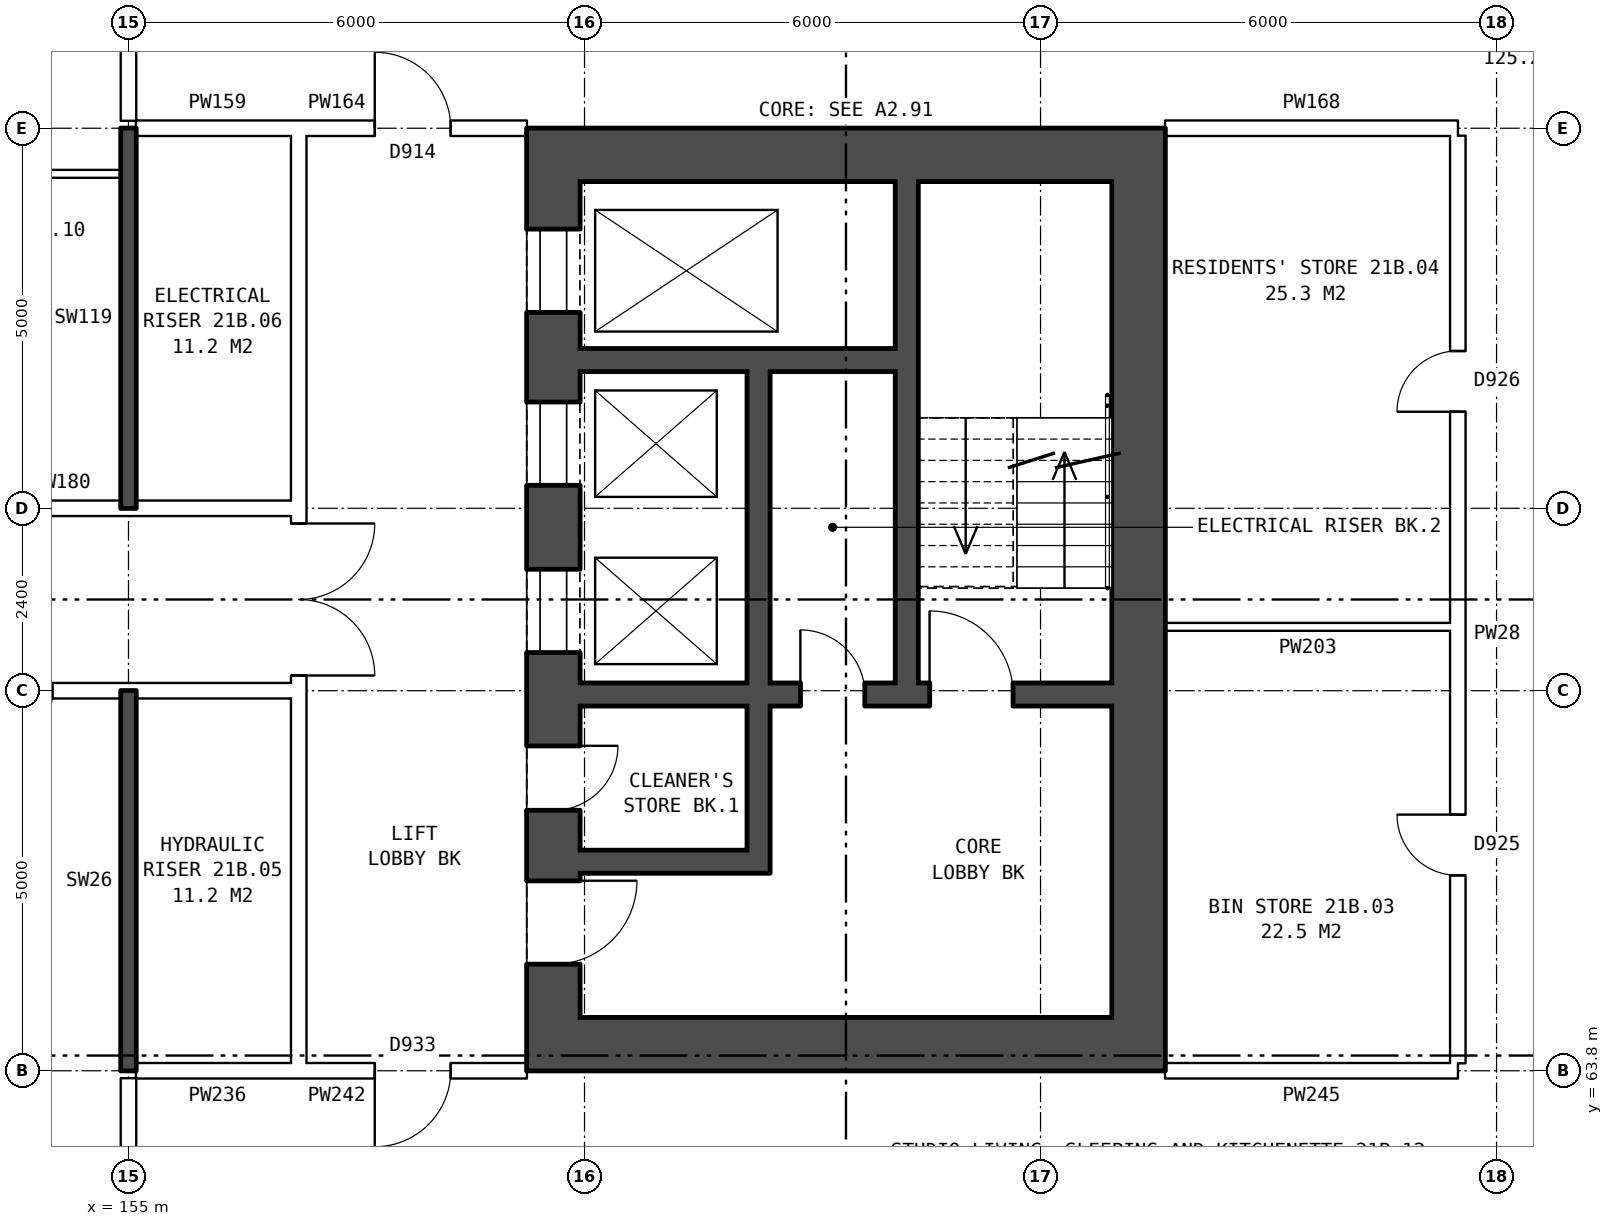
"""IFC4 building model, lengths in metres.
Left out: names, types, materials, properties, quantities, classifications, styles, units other than length and angle.
Written with IfcOpenShell. Run it as: python <this file> out.ifc"""

import sys

from ifc_helpers import new_model, si_unit, direction, frame, frame_2d, origin, place, context, subcontext, project, spatial, rectangle, extrude, element, fill, save


model = new_model("IFC4")
c1 = context("Model", 3, precision=1e-05, world=origin(), true_north=direction((0.0, 1.0)))
c2 = subcontext(c1, "Body", "Model", "MODEL_VIEW")
j1 = project(units=[si_unit("LENGTHUNIT", "METRE"), si_unit("PLANEANGLEUNIT", "RADIAN")], contexts=[c1])
p1 = place(None, origin())
s1 = spatial("IfcSite", under=j1, at=p1, CompositionType="ELEMENT")
p2 = place(p1, origin())
s2 = spatial("IfcBuilding", under=s1, at=p2, CompositionType="ELEMENT")
p3 = place(p2, frame((0.0, 0.0, 77.8)))
s3 = spatial("IfcBuildingStorey", under=s2, at=p3, CompositionType="ELEMENT", Elevation=77.8)
p4 = place(p3, frame((160.59, 75.5, 0.0), z_axis=(0.0, 0.0, 1.0), x_axis=(0.0, -1.0, 0.0)))
e1 = element("IfcWall", 1, at=p4, inside=s3, PredefinedType="SHEAR", context=c2, shape_type="SweptSolid", body=[
    extrude(rectangle(XDim=11.0, YDim=0.7, at=frame_2d((5.5, 0.0))), origin(), (0.0, 0.0, 1.0), 2.85),
])
p5 = place(p4, frame((0.625, 0.0, 0.0)))
e2 = element("IfcOpeningElement", 2, at=p5, cuts=e1, PredefinedType="OPENING", context=c2, shape_type="SweptSolid", body=[
    extrude(rectangle(XDim=1.1, YDim=2.1, at=frame_2d((0.55, 1.05))), frame((0.0, 0.36, 0.0), z_axis=(0.0, -1.0, 0.0), x_axis=(1.0, 0.0, 0.0)), (0.0, 0.0, 1.0), 0.72),
])
p6 = place(p4, frame((2.9, 0.0, 0.0)))
e3 = element("IfcOpeningElement", 3, at=p6, cuts=e1, PredefinedType="OPENING", context=c2, shape_type="SweptSolid", body=[
    extrude(rectangle(XDim=1.1, YDim=2.1, at=frame_2d((0.55, 1.05))), frame((0.0, 0.36, 0.0), z_axis=(0.0, -1.0, 0.0), x_axis=(1.0, 0.0, 0.0)), (0.0, 0.0, 1.0), 0.72),
])
p7 = place(p4, frame((5.1, 0.0, 0.0)))
e4 = element("IfcOpeningElement", 4, at=p7, cuts=e1, PredefinedType="OPENING", context=c2, shape_type="SweptSolid", body=[
    extrude(rectangle(XDim=1.1, YDim=2.1, at=frame_2d((0.55, 1.05))), frame((0.0, 0.36, 0.0), z_axis=(0.0, -1.0, 0.0), x_axis=(1.0, 0.0, 0.0)), (0.0, 0.0, 1.0), 0.72),
])
p8 = place(p4, frame((9.2, 0.0, 0.0)))
e5 = element("IfcOpeningElement", 5, at=p8, cuts=e1, PredefinedType="OPENING", context=c2, shape_type="SweptSolid", body=[
    extrude(rectangle(XDim=1.1, YDim=2.1, at=frame_2d((0.55, 1.05))), frame((0.0, 0.36, 0.0), z_axis=(0.0, -1.0, 0.0), x_axis=(1.0, 0.0, 0.0)), (0.0, 0.0, 1.0), 0.72),
])
p9 = place(p4, frame((7.425, 0.0, 0.0)))
e6 = element("IfcOpeningElement", 6, at=p9, cuts=e1, PredefinedType="OPENING", context=c2, shape_type="SweptSolid", body=[
    extrude(rectangle(XDim=0.85, YDim=2.1, at=frame_2d((0.425, 1.05))), frame((0.0, 0.36, 0.0), z_axis=(0.0, -1.0, 0.0), x_axis=(1.0, 0.0, 0.0)), (0.0, 0.0, 1.0), 0.72),
])
p10 = place(p3, frame((168.29, 75.5, 0.0), z_axis=(0.0, 0.0, 1.0), x_axis=(0.0, -1.0, 0.0)))
e7 = element("IfcWall", 7, at=p10, inside=s3, PredefinedType="SHEAR", context=c2, shape_type="SweptSolid", body=[
    extrude(rectangle(XDim=11.0, YDim=0.7, at=frame_2d((5.5, 0.0))), origin(), (0.0, 0.0, 1.0), 2.85),
])
for number, where, z_axis, x_axis in (
    (8, (160.24, 75.85, 0.0), (0.0, 0.0, 1.0), (1.0, 0.0, 0.0)),
    (9, (160.24, 64.15, 0.0), (0.0, 0.0, 1.0), (1.0, 0.0, 0.0)),
):
    element("IfcWall", number, at=place(p3, frame(where, z_axis=z_axis, x_axis=x_axis)), inside=s3, PredefinedType="SHEAR", context=c2, shape_type="SweptSolid", body=[
        extrude(rectangle(XDim=8.4, YDim=0.7, at=frame_2d((4.2, 0.0))), origin(), (0.0, 0.0, 1.0), 2.85),
    ])
p11 = place(p3, frame((160.94, 73.15, 0.0), z_axis=(0.0, 0.0, 1.0), x_axis=(1.0, 0.0, 0.0)))
e10 = element("IfcWall", 10, at=p11, inside=s3, PredefinedType="SHEAR", context=c2, shape_type="SweptSolid", body=[
    extrude(rectangle(XDim=4.15, YDim=0.3, at=frame_2d((2.075, 0.0))), origin(), (0.0, 0.0, 1.0), 2.85),
])
p12 = place(p3, frame((160.94, 68.75, 0.0), z_axis=(0.0, 0.0, 1.0), x_axis=(1.0, 0.0, 0.0)))
e11 = element("IfcWall", 11, at=p12, inside=s3, PredefinedType="SHEAR", context=c2, shape_type="SweptSolid", body=[
    extrude(rectangle(XDim=7.0, YDim=0.3, at=frame_2d((3.5, 0.0))), origin(), (0.0, 0.0, 1.0), 2.85),
])
p13 = place(p12, frame((4.6, 0.0, 0.0)))
e12 = element("IfcOpeningElement", 12, at=p13, cuts=e11, PredefinedType="OPENING", context=c2, shape_type="SweptSolid", body=[
    extrude(rectangle(XDim=1.1, YDim=2.1, at=frame_2d((0.55, 1.05))), frame((0.0, 0.16, 0.0), z_axis=(0.0, -1.0, 0.0), x_axis=(1.0, 0.0, 0.0)), (0.0, 0.0, 1.0), 0.32),
])
p14 = place(p12, frame((2.9, 0.0, 0.0)))
e13 = element("IfcOpeningElement", 13, at=p14, cuts=e11, PredefinedType="OPENING", context=c2, shape_type="SweptSolid", body=[
    extrude(rectangle(XDim=0.85, YDim=2.1, at=frame_2d((0.425, 1.05))), frame((0.0, 0.16, 0.0), z_axis=(0.0, -1.0, 0.0), x_axis=(1.0, 0.0, 0.0)), (0.0, 0.0, 1.0), 0.32),
])
p15 = place(p3, frame((160.94, 66.55, 0.0), z_axis=(0.0, 0.0, 1.0), x_axis=(1.0, 0.0, 0.0)))
e14 = element("IfcWall", 14, at=p15, inside=s3, PredefinedType="SHEAR", context=c2, shape_type="SweptSolid", body=[
    extrude(rectangle(XDim=2.2, YDim=0.3, at=frame_2d((1.1, 0.0))), origin(), (0.0, 0.0, 1.0), 2.85),
])
p16 = place(p3, frame((163.29, 73.0, 0.0), z_axis=(0.0, 0.0, 1.0), x_axis=(0.0, -1.0, 0.0)))
e15 = element("IfcWall", 15, at=p16, inside=s3, PredefinedType="SHEAR", context=c2, shape_type="SweptSolid", body=[
    extrude(rectangle(XDim=4.1, YDim=0.3, at=frame_2d((2.05, 0.0))), origin(), (0.0, 0.0, 1.0), 2.85),
])
p17 = place(p3, frame((163.29, 68.6, 0.0), z_axis=(0.0, 0.0, 1.0), x_axis=(0.0, -1.0, 0.0)))
e16 = element("IfcWall", 16, at=p17, inside=s3, PredefinedType="SHEAR", context=c2, shape_type="SweptSolid", body=[
    extrude(rectangle(XDim=2.2, YDim=0.3, at=frame_2d((1.1, 0.0))), origin(), (0.0, 0.0, 1.0), 2.85),
])
p18 = place(p3, frame((165.24, 75.5, 0.0), z_axis=(0.0, 0.0, 1.0), x_axis=(0.0, -1.0, 0.0)))
e17 = element("IfcWall", 17, at=p18, inside=s3, PredefinedType="SHEAR", context=c2, shape_type="SweptSolid", body=[
    extrude(rectangle(XDim=6.6, YDim=0.3, at=frame_2d((3.3, 0.0))), origin(), (0.0, 0.0, 1.0), 2.85),
])
p19 = place(p3, frame((157.24, 63.9, 0.0), z_axis=(0.0, 0.0, 1.0), x_axis=(0.0, 1.0, 0.0)))
e18 = element("IfcWall", 18, at=p19, inside=s3, PredefinedType="PARTITIONING", context=c2, shape_type="SweptSolid", body=[
    extrude(rectangle(XDim=12.2, YDim=0.2, at=frame_2d((6.1, 0.0))), origin(), (0.0, 0.0, 1.0), 2.85),
])
p20 = place(p19, frame((5.1, 0.0, 0.0)))
e19 = element("IfcOpeningElement", 19, at=p20, cuts=e18, PredefinedType="OPENING", context=c2, shape_type="SweptSolid", body=[
    extrude(rectangle(XDim=2.0, YDim=2.1, at=frame_2d((1.0, 1.05))), frame((0.0, 0.11, 0.0), z_axis=(0.0, -1.0, 0.0), x_axis=(1.0, 0.0, 0.0)), (0.0, 0.0, 1.0), 0.22),
])
p21 = place(p3, frame((155.1, 63.8, 0.0), z_axis=(0.0, 0.0, 1.0), x_axis=(1.0, 0.0, 0.0)))
e20 = element("IfcWall", 20, at=p21, inside=s3, PredefinedType="PARTITIONING", context=c2, shape_type="SweptSolid", body=[
    extrude(rectangle(XDim=2.14, YDim=0.2, at=frame_2d((1.07, 0.0))), origin(), (0.0, 0.0, 1.0), 2.85),
])
p22 = place(p3, frame((157.24, 63.8, 0.0), z_axis=(0.0, 0.0, 1.0), x_axis=(1.0, 0.0, 0.0)))
e21 = element("IfcWall", 21, at=p22, inside=s3, PredefinedType="PARTITIONING", context=c2, shape_type="SweptSolid", body=[
    extrude(rectangle(XDim=3.0, YDim=0.2, at=frame_2d((1.5, 0.0))), origin(), (0.0, 0.0, 1.0), 2.85),
])
p23 = place(p22, frame((1.0, 0.0, 0.0)))
e22 = element("IfcOpeningElement", 22, at=p23, cuts=e21, PredefinedType="OPENING", context=c2, shape_type="SweptSolid", body=[
    extrude(rectangle(XDim=1.0, YDim=2.1, at=frame_2d((0.5, 1.05))), frame((0.0, 0.11, 0.0), z_axis=(0.0, -1.0, 0.0), x_axis=(1.0, 0.0, 0.0)), (0.0, 0.0, 1.0), 0.22),
])
p24 = place(p3, frame((168.64, 63.8, 0.0), z_axis=(0.0, 0.0, 1.0), x_axis=(1.0, 0.0, 0.0)))
e23 = element("IfcWall", 23, at=p24, inside=s3, PredefinedType="PARTITIONING", context=c2, shape_type="SweptSolid", body=[
    extrude(rectangle(XDim=3.85, YDim=0.2, at=frame_2d((1.925, 0.0))), origin(), (0.0, 0.0, 1.0), 2.85),
])
p25 = place(p3, frame((142.76, 68.8, 0.0), z_axis=(0.0, 0.0, 1.0), x_axis=(1.0, 0.0, 0.0)))
e24 = element("IfcWall", 24, at=p25, inside=s3, PredefinedType="PARTITIONING", context=c2, shape_type="SweptSolid", body=[
    extrude(rectangle(XDim=14.48, YDim=0.2, at=frame_2d((7.24, 0.0))), origin(), (0.0, 0.0, 1.0), 2.85),
])
p26 = place(p25, frame((4.24, 0.0, 0.0)))
e25 = element("IfcOpeningElement", 25, at=p26, cuts=e24, PredefinedType="OPENING", context=c2, shape_type="SweptSolid", body=[
    extrude(rectangle(XDim=1.0, YDim=2.1, at=frame_2d((0.5, 1.05))), frame((0.0, 0.11, 0.0), z_axis=(0.0, -1.0, 0.0), x_axis=(1.0, 0.0, 0.0)), (0.0, 0.0, 1.0), 0.22),
])
p27 = place(p25, frame((10.24, 0.0, 0.0)))
e26 = element("IfcOpeningElement", 26, at=p27, cuts=e24, PredefinedType="OPENING", context=c2, shape_type="SweptSolid", body=[
    extrude(rectangle(XDim=1.0, YDim=2.1, at=frame_2d((0.5, 1.05))), frame((0.0, 0.11, 0.0), z_axis=(0.0, -1.0, 0.0), x_axis=(1.0, 0.0, 0.0)), (0.0, 0.0, 1.0), 0.22),
])
p28 = place(p3, frame((168.64, 69.64, 0.0), z_axis=(0.0, 0.0, 1.0), x_axis=(1.0, 0.0, 0.0)))
e27 = element("IfcWall", 27, at=p28, inside=s3, PredefinedType="PARTITIONING", context=c2, shape_type="SweptSolid", body=[
    extrude(rectangle(XDim=3.75, YDim=0.1, at=frame_2d((1.875, 0.0))), origin(), (0.0, 0.0, 1.0), 2.85),
])
p29 = place(p3, frame((142.76, 71.2, 0.0), z_axis=(0.0, 0.0, 1.0), x_axis=(1.0, 0.0, 0.0)))
e28 = element("IfcWall", 28, at=p29, inside=s3, PredefinedType="PARTITIONING", context=c2, shape_type="SweptSolid", body=[
    extrude(rectangle(XDim=14.48, YDim=0.2, at=frame_2d((7.24, 0.0))), origin(), (0.0, 0.0, 1.0), 2.85),
])
p30 = place(p29, frame((4.24, 0.0, 0.0)))
e29 = element("IfcOpeningElement", 29, at=p30, cuts=e28, PredefinedType="OPENING", context=c2, shape_type="SweptSolid", body=[
    extrude(rectangle(XDim=1.0, YDim=2.1, at=frame_2d((0.5, 1.05))), frame((0.0, 0.11, 0.0), z_axis=(0.0, -1.0, 0.0), x_axis=(1.0, 0.0, 0.0)), (0.0, 0.0, 1.0), 0.22),
])
p31 = place(p29, frame((7.24, 0.0, 0.0)))
e30 = element("IfcOpeningElement", 30, at=p31, cuts=e28, PredefinedType="OPENING", context=c2, shape_type="SweptSolid", body=[
    extrude(rectangle(XDim=1.0, YDim=2.1, at=frame_2d((0.5, 1.05))), frame((0.0, 0.11, 0.0), z_axis=(0.0, -1.0, 0.0), x_axis=(1.0, 0.0, 0.0)), (0.0, 0.0, 1.0), 0.22),
])
p32 = place(p3, frame((152.0, 75.6, 0.0), z_axis=(0.0, 0.0, 1.0), x_axis=(1.0, 0.0, 0.0)))
e31 = element("IfcWall", 31, at=p32, inside=s3, PredefinedType="PARTITIONING", context=c2, shape_type="SweptSolid", body=[
    extrude(rectangle(XDim=2.9, YDim=0.1, at=frame_2d((1.45, 0.0))), origin(), (0.0, 0.0, 1.0), 2.85),
])
p33 = place(p3, frame((155.1, 76.2, 0.0), z_axis=(0.0, 0.0, 1.0), x_axis=(1.0, 0.0, 0.0)))
e32 = element("IfcWall", 32, at=p33, inside=s3, PredefinedType="PARTITIONING", context=c2, shape_type="SweptSolid", body=[
    extrude(rectangle(XDim=2.14, YDim=0.2, at=frame_2d((1.07, 0.0))), origin(), (0.0, 0.0, 1.0), 2.85),
])
p34 = place(p3, frame((157.24, 76.2, 0.0), z_axis=(0.0, 0.0, 1.0), x_axis=(1.0, 0.0, 0.0)))
e33 = element("IfcWall", 33, at=p34, inside=s3, PredefinedType="PARTITIONING", context=c2, shape_type="SweptSolid", body=[
    extrude(rectangle(XDim=3.0, YDim=0.2, at=frame_2d((1.5, 0.0))), origin(), (0.0, 0.0, 1.0), 2.85),
])
p35 = place(p34, frame((1.0, 0.0, 0.0)))
e34 = element("IfcOpeningElement", 34, at=p35, cuts=e33, PredefinedType="OPENING", context=c2, shape_type="SweptSolid", body=[
    extrude(rectangle(XDim=1.0, YDim=2.1, at=frame_2d((0.5, 1.05))), frame((0.0, 0.11, 0.0), z_axis=(0.0, -1.0, 0.0), x_axis=(1.0, 0.0, 0.0)), (0.0, 0.0, 1.0), 0.22),
])
p36 = place(p3, frame((168.64, 76.2, 0.0), z_axis=(0.0, 0.0, 1.0), x_axis=(1.0, 0.0, 0.0)))
e35 = element("IfcWall", 35, at=p36, inside=s3, PredefinedType="PARTITIONING", context=c2, shape_type="SweptSolid", body=[
    extrude(rectangle(XDim=3.85, YDim=0.2, at=frame_2d((1.925, 0.0))), origin(), (0.0, 0.0, 1.0), 2.85),
])
p37 = place(p3, frame((155.0, 61.5, 0.0), z_axis=(0.0, 0.0, 1.0), x_axis=(0.0, 1.0, 0.0)))
e36 = element("IfcWall", 36, at=p37, inside=s3, PredefinedType="PARTITIONING", context=c2, shape_type="SweptSolid", body=[
    extrude(rectangle(XDim=2.2, YDim=0.2, at=frame_2d((1.1, 0.0))), origin(), (0.0, 0.0, 1.0), 2.85),
])
for number, where, z_axis, x_axis in (
    (37, (155.0, 63.8, 0.0), (0.0, 0.0, 1.0), (0.0, 1.0, 0.0)),
    (38, (155.0, 71.2, 0.0), (0.0, 0.0, 1.0), (0.0, 1.0, 0.0)),
):
    element("IfcWall", number, at=place(p3, frame(where, z_axis=z_axis, x_axis=x_axis)), inside=s3, PredefinedType="SOLIDWALL", context=c2, shape_type="SweptSolid", body=[
        extrude(rectangle(XDim=5.0, YDim=0.2, at=frame_2d((2.5, 0.0))), origin(), (0.0, 0.0, 1.0), 2.85),
    ])
p38 = place(p3, frame((155.0, 76.3, 0.0), z_axis=(0.0, 0.0, 1.0), x_axis=(0.0, 1.0, 0.0)))
e39 = element("IfcWall", 39, at=p38, inside=s3, PredefinedType="PARTITIONING", context=c2, shape_type="SweptSolid", body=[
    extrude(rectangle(XDim=2.2, YDim=0.2, at=frame_2d((1.1, 0.0))), origin(), (0.0, 0.0, 1.0), 2.85),
])
p39 = place(p3, frame((172.49, 63.9, 0.0), z_axis=(0.0, 0.0, 1.0), x_axis=(0.0, 1.0, 0.0)))
e40 = element("IfcWall", 40, at=p39, inside=s3, PredefinedType="PARTITIONING", context=c2, shape_type="SweptSolid", body=[
    extrude(rectangle(XDim=12.2, YDim=0.2, at=frame_2d((6.1, 0.0))), origin(), (0.0, 0.0, 1.0), 2.85),
])
p40 = place(p39, frame((2.47, 0.0, 0.0)))
e41 = element("IfcOpeningElement", 41, at=p40, cuts=e40, PredefinedType="OPENING", context=c2, shape_type="SweptSolid", body=[
    extrude(rectangle(XDim=0.8, YDim=2.1, at=frame_2d((0.4, 1.05))), frame((0.0, 0.11, 0.0), z_axis=(0.0, -1.0, 0.0), x_axis=(1.0, 0.0, 0.0)), (0.0, 0.0, 1.0), 0.22),
])
p41 = place(p39, frame((8.57, 0.0, 0.0)))
e42 = element("IfcOpeningElement", 42, at=p41, cuts=e40, PredefinedType="OPENING", context=c2, shape_type="SweptSolid", body=[
    extrude(rectangle(XDim=0.8, YDim=2.1, at=frame_2d((0.4, 1.05))), frame((0.0, 0.11, 0.0), z_axis=(0.0, -1.0, 0.0), x_axis=(1.0, 0.0, 0.0)), (0.0, 0.0, 1.0), 0.22),
])
p42 = place(p5, origin())
e43 = element("IfcDoor", 43, at=p42, inside=s3, OperationType="DOUBLE_DOOR_SLIDING", PredefinedType="DOOR", context=c2, shape_type="SweptSolid", body=[
    extrude(rectangle(XDim=1.1, YDim=2.1, at=frame_2d((0.55, 1.05))), frame((0.0, 0.335, 0.0), z_axis=(0.0, -1.0, 0.0), x_axis=(1.0, 0.0, 0.0)), (0.0, 0.0, 1.0), 0.05),
])
fill(e2, e43)
p43 = place(p6, origin())
e44 = element("IfcDoor", 44, at=p43, inside=s3, OperationType="DOUBLE_DOOR_SLIDING", PredefinedType="DOOR", context=c2, shape_type="SweptSolid", body=[
    extrude(rectangle(XDim=1.1, YDim=2.1, at=frame_2d((0.55, 1.05))), frame((0.0, 0.335, 0.0), z_axis=(0.0, -1.0, 0.0), x_axis=(1.0, 0.0, 0.0)), (0.0, 0.0, 1.0), 0.05),
])
fill(e3, e44)
p44 = place(p7, origin())
e45 = element("IfcDoor", 45, at=p44, inside=s3, OperationType="DOUBLE_DOOR_SLIDING", PredefinedType="DOOR", context=c2, shape_type="SweptSolid", body=[
    extrude(rectangle(XDim=1.1, YDim=2.1, at=frame_2d((0.55, 1.05))), frame((0.0, 0.335, 0.0), z_axis=(0.0, -1.0, 0.0), x_axis=(1.0, 0.0, 0.0)), (0.0, 0.0, 1.0), 0.05),
])
fill(e4, e45)
p45 = place(p8, origin())
e46 = element("IfcDoor", 46, at=p45, inside=s3, OperationType="SINGLE_SWING_LEFT", PredefinedType="DOOR", context=c2, shape_type="SweptSolid", body=[
    extrude(rectangle(XDim=1.1, YDim=2.1, at=frame_2d((0.55, 1.05))), frame((0.0, 0.335, 0.0), z_axis=(0.0, -1.0, 0.0), x_axis=(1.0, 0.0, 0.0)), (0.0, 0.0, 1.0), 0.05),
])
fill(e5, e46)
p46 = place(p13, origin())
e47 = element("IfcDoor", 47, at=p46, inside=s3, OperationType="SINGLE_SWING_LEFT", PredefinedType="DOOR", context=c2, shape_type="SweptSolid", body=[
    extrude(rectangle(XDim=1.1, YDim=2.1, at=frame_2d((0.55, 1.05))), frame((0.0, 0.025, 0.0), z_axis=(0.0, -1.0, 0.0), x_axis=(1.0, 0.0, 0.0)), (0.0, 0.0, 1.0), 0.05),
])
fill(e12, e47)
p47 = place(p9, origin())
e48 = element("IfcDoor", 48, at=p47, inside=s3, OperationType="SINGLE_SWING_LEFT", PredefinedType="DOOR", context=c2, shape_type="SweptSolid", body=[
    extrude(rectangle(XDim=0.85, YDim=2.1, at=frame_2d((0.425, 1.05))), frame((0.0, 0.335, 0.0), z_axis=(0.0, -1.0, 0.0), x_axis=(1.0, 0.0, 0.0)), (0.0, 0.0, 1.0), 0.05),
])
fill(e6, e48)
p48 = place(p14, origin())
e49 = element("IfcDoor", 49, at=p48, inside=s3, OperationType="SINGLE_SWING_LEFT", PredefinedType="DOOR", context=c2, shape_type="SweptSolid", body=[
    extrude(rectangle(XDim=0.85, YDim=2.1, at=frame_2d((0.425, 1.05))), frame((0.0, 0.025, 0.0), z_axis=(0.0, -1.0, 0.0), x_axis=(1.0, 0.0, 0.0)), (0.0, 0.0, 1.0), 0.05),
])
fill(e13, e49)
p49 = place(p20, frame((2.0, 0.0, 0.0), z_axis=(0.0, 0.0, 1.0), x_axis=(-1.0, 0.0, 0.0)))
e50 = element("IfcDoor", 50, at=p49, inside=s3, OperationType="DOUBLE_DOOR_SINGLE_SWING", PredefinedType="DOOR", context=c2, shape_type="SweptSolid", body=[
    extrude(rectangle(XDim=2.0, YDim=2.1, at=frame_2d((1.0, 1.05))), frame((0.0, 0.025, 0.0), z_axis=(0.0, -1.0, 0.0), x_axis=(1.0, 0.0, 0.0)), (0.0, 0.0, 1.0), 0.05),
])
fill(e19, e50)
p50 = place(p23, frame((1.0, 0.0, 0.0), z_axis=(0.0, 0.0, 1.0), x_axis=(-1.0, 0.0, 0.0)))
e51 = element("IfcDoor", 51, at=p50, inside=s3, OperationType="SINGLE_SWING_RIGHT", PredefinedType="DOOR", context=c2, shape_type="SweptSolid", body=[
    extrude(rectangle(XDim=1.0, YDim=2.1, at=frame_2d((0.5, 1.05))), frame((0.0, 0.025, 0.0), z_axis=(0.0, -1.0, 0.0), x_axis=(1.0, 0.0, 0.0)), (0.0, 0.0, 1.0), 0.05),
])
fill(e22, e51)
p51 = place(p35, origin())
e52 = element("IfcDoor", 52, at=p51, inside=s3, OperationType="SINGLE_SWING_LEFT", PredefinedType="DOOR", context=c2, shape_type="SweptSolid", body=[
    extrude(rectangle(XDim=1.0, YDim=2.1, at=frame_2d((0.5, 1.05))), frame((0.0, 0.025, 0.0), z_axis=(0.0, -1.0, 0.0), x_axis=(1.0, 0.0, 0.0)), (0.0, 0.0, 1.0), 0.05),
])
fill(e34, e52)
p52 = place(p40, origin())
e53 = element("IfcDoor", 53, at=p52, inside=s3, OperationType="SINGLE_SWING_RIGHT", PredefinedType="DOOR", context=c2, shape_type="SweptSolid", body=[
    extrude(rectangle(XDim=0.8, YDim=2.1, at=frame_2d((0.4, 1.05))), frame((0.0, 0.025, 0.0), z_axis=(0.0, -1.0, 0.0), x_axis=(1.0, 0.0, 0.0)), (0.0, 0.0, 1.0), 0.05),
])
fill(e41, e53)
p53 = place(p41, origin())
e54 = element("IfcDoor", 54, at=p53, inside=s3, OperationType="SINGLE_SWING_LEFT", PredefinedType="DOOR", context=c2, shape_type="SweptSolid", body=[
    extrude(rectangle(XDim=0.8, YDim=2.1, at=frame_2d((0.4, 1.05))), frame((0.0, 0.025, 0.0), z_axis=(0.0, -1.0, 0.0), x_axis=(1.0, 0.0, 0.0)), (0.0, 0.0, 1.0), 0.05),
])
fill(e42, e54)
save(model, sys.argv[1])
